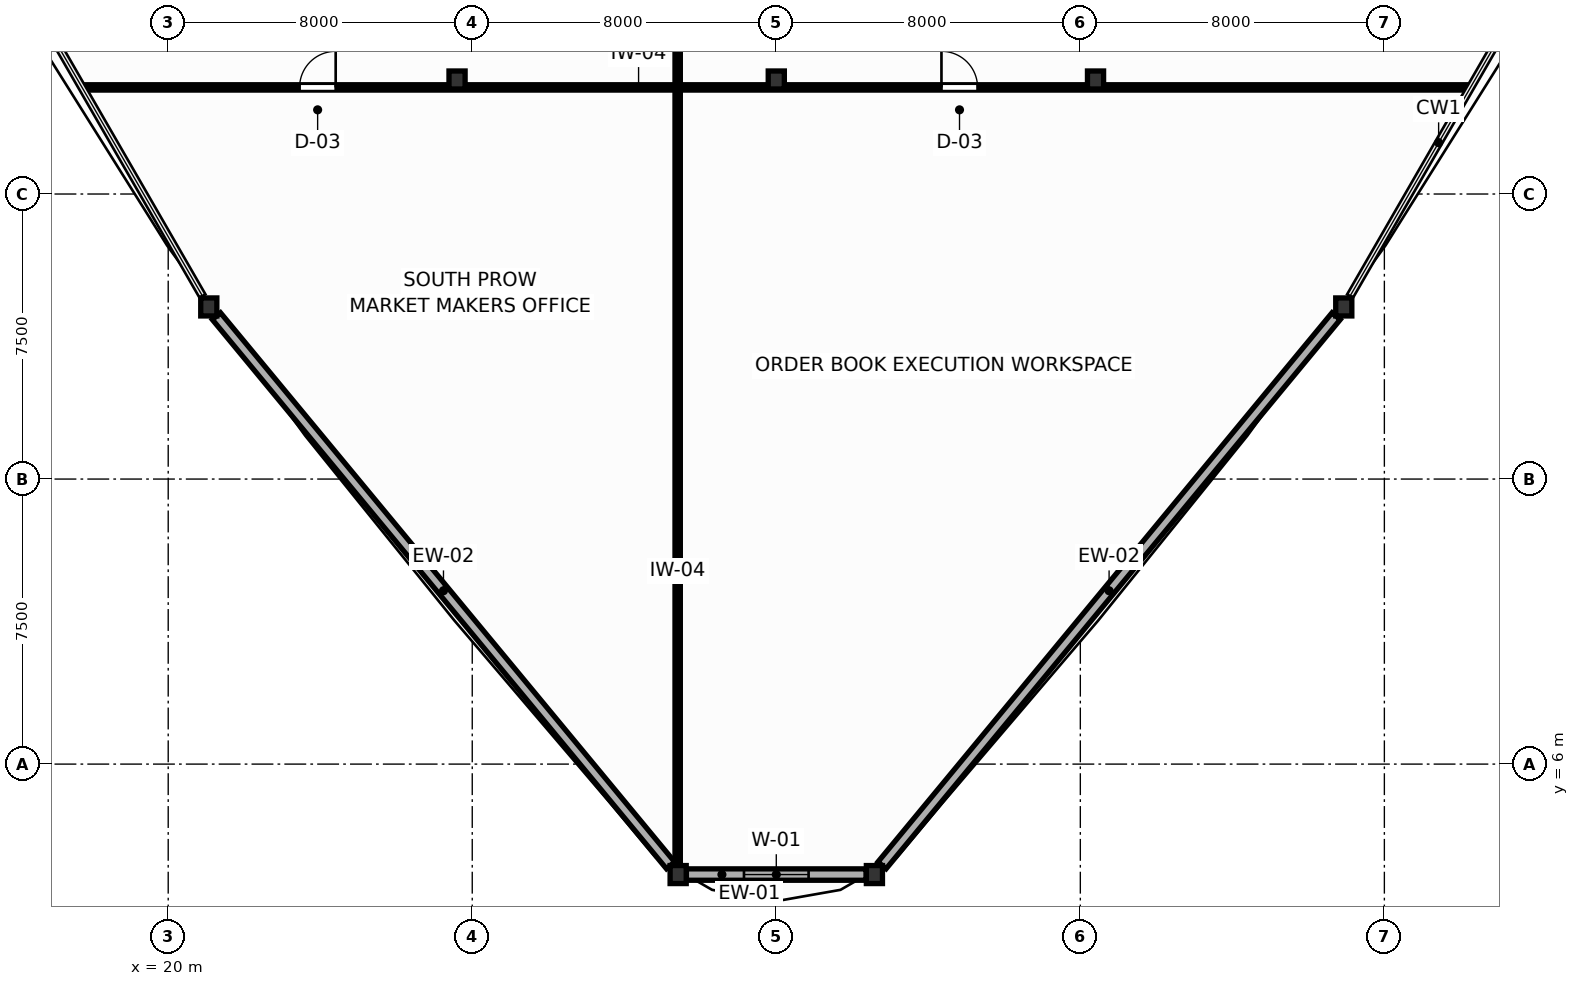
"""IFC4 building model, lengths in metres.
Left out: names, types, materials, properties, quantities, classifications, styles, units other than length and angle.
Written with IfcOpenShell. Run it as: python <this file> out.ifc"""

import sys

from ifc_helpers import new_model, si_unit, direction, frame, frame_2d, origin, origin_2d, place, context, subcontext, project, spatial, rectangle, i_section, extrude, source, transform, mapped, element, fill, save


model = new_model("IFC4")
c1 = context("Model", 3, precision=1e-05, world=origin(), true_north=direction((0.0, 1.0)))
c2 = subcontext(c1, "Body", "Model", "MODEL_VIEW")
j1 = project(units=[si_unit("LENGTHUNIT", "METRE"), si_unit("PLANEANGLEUNIT", "RADIAN")], contexts=[c1])
p1 = place(None, origin())
s1 = spatial("IfcSite", under=j1, at=p1, CompositionType="ELEMENT")
p2 = place(p1, origin())
s2 = spatial("IfcBuilding", under=s1, at=p2, CompositionType="ELEMENT")
p3 = place(p2, frame((0.0, 0.0, 27.9)))
s3 = spatial("IfcBuildingStorey", under=s2, at=p3, CompositionType="ELEMENT", Elevation=27.9)
m1 = source(origin(), c2, "Body", "SweptSolid", [
    extrude(i_section(OverallWidth=0.424, OverallDepth=0.474, WebThickness=0.045, FlangeThickness=0.072, FilletRadius=0.015, at=origin_2d()), origin(), (0.0, 0.0, 1.0), 3.9),
])
for number, where, z_axis, x_axis in (
    (1, (27.6, 24.0, 0.0), (0.0, 0.0, 1.0), (1.0, 0.0, 0.0)),
    (2, (44.4, 24.0, 0.0), (0.0, 0.0, 1.0), (1.0, 0.0, 0.0)),
    (3, (36.0, 24.0, 0.0), (0.0, 0.0, 1.0), (1.0, 0.0, 0.0)),
    (4, (21.068, 18.029, 0.0), (0.0, 0.0, 1.0), (1.0, 0.0, 0.0)),
    (5, (33.418, 3.094, 0.0), (0.0, 0.0, 1.0), (1.0, 0.0, 0.0)),
    (6, (38.582, 3.094, 0.0), (0.0, 0.0, 1.0), (1.0, 0.0, 0.0)),
    (7, (50.932, 18.029, 0.0), (0.0, 0.0, 1.0), (1.0, 0.0, 0.0)),
):
    element("IfcColumn", number, at=place(p3, frame(where, z_axis=z_axis, x_axis=x_axis)), inside=s3, PredefinedType="COLUMN", context=c2, shape_type="MappedRepresentation", body=[
        mapped(m1, transform((0.0, 0.0, 0.0), scale=1.0)),
    ])
p4 = place(p3, frame((21.268, 17.787, 0.0), z_axis=(0.0, 0.0, 1.0), x_axis=(0.637262575447, -0.770646747826, 0.0)))
e8 = element("IfcWall", 8, at=p4, inside=s3, PredefinedType="SOLIDWALL", context=c2, shape_type="SweptSolid", body=[
    extrude(rectangle(XDim=18.752, YDim=0.28, at=frame_2d((9.376, 0.0))), origin(), (0.0, 0.0, 1.0), 3.23),
])
p5 = place(p3, frame((33.635, 3.094, 0.0), z_axis=(0.0, 0.0, 1.0), x_axis=(1.0, 0.0, 0.0)))
e9 = element("IfcWall", 9, at=p5, inside=s3, PredefinedType="SOLIDWALL", context=c2, shape_type="SweptSolid", body=[
    extrude(rectangle(XDim=4.73, YDim=0.3, at=frame_2d((2.365, 0.0))), origin(), (0.0, 0.0, 1.0), 3.23),
])
p6 = place(p5, frame((1.515, 0.0, 0.75)))
e10 = element("IfcOpeningElement", 10, at=p6, cuts=e9, PredefinedType="OPENING", context=c2, shape_type="SweptSolid", body=[
    extrude(rectangle(XDim=1.7, YDim=1.75, at=frame_2d((0.85, 0.875))), frame((0.0, 0.16, 0.0), z_axis=(0.0, -1.0, 0.0), x_axis=(1.0, 0.0, 0.0)), (0.0, 0.0, 1.0), 0.32),
])
p7 = place(p3, frame((38.782, 3.336, 0.0), z_axis=(0.0, 0.0, 1.0), x_axis=(0.637262575447, 0.770646747826, 0.0)))
e11 = element("IfcWall", 11, at=p7, inside=s3, PredefinedType="SOLIDWALL", context=c2, shape_type="SweptSolid", body=[
    extrude(rectangle(XDim=18.752, YDim=0.28, at=frame_2d((9.376, 0.0))), origin(), (0.0, 0.0, 1.0), 3.23),
])
p8 = place(p3, frame((17.753, 23.805, 0.0), z_axis=(0.0, 0.0, 1.0), x_axis=(1.0, 0.0, 0.0)))
e12 = element("IfcWall", 12, at=p8, inside=s3, PredefinedType="PARTITIONING", context=c2, shape_type="SweptSolid", body=[
    extrude(rectangle(XDim=36.494, YDim=0.14, at=frame_2d((18.247, 0.0))), origin(), (0.0, 0.0, 1.0), 3.18),
])
p9 = place(p8, frame((5.704, 0.0, 0.0)))
e13 = element("IfcOpeningElement", 13, at=p9, cuts=e12, PredefinedType="OPENING", context=c2, shape_type="SweptSolid", body=[
    extrude(rectangle(XDim=0.95, YDim=2.05, at=frame_2d((0.475, 1.025))), frame((0.0, 0.08, 0.0), z_axis=(0.0, -1.0, 0.0), x_axis=(1.0, 0.0, 0.0)), (0.0, 0.0, 1.0), 0.16),
])
p10 = place(p8, frame((22.593, 0.0, 0.0)))
e14 = element("IfcOpeningElement", 14, at=p10, cuts=e12, PredefinedType="OPENING", context=c2, shape_type="SweptSolid", body=[
    extrude(rectangle(XDim=0.95, YDim=2.05, at=frame_2d((0.475, 1.025))), frame((0.0, 0.08, 0.0), z_axis=(0.0, -1.0, 0.0), x_axis=(1.0, 0.0, 0.0)), (0.0, 0.0, 1.0), 0.16),
])
p11 = place(p3, frame((33.405, 3.129, 0.0), z_axis=(0.0, 0.0, 1.0), x_axis=(0.0, 1.0, 0.0)))
e15 = element("IfcWall", 15, at=p11, inside=s3, PredefinedType="PARTITIONING", context=c2, shape_type="SweptSolid", body=[
    extrude(rectangle(XDim=23.561, YDim=0.14, at=frame_2d((11.78, 0.0))), origin(), (0.0, 0.0, 1.0), 3.18),
])
p12 = place(p6, origin())
e16 = element("IfcWindow", 16, at=p12, inside=s3, PartitioningType="SINGLE_PANEL", PredefinedType="WINDOW", context=c2, shape_type="SweptSolid", body=[
    extrude(rectangle(XDim=1.7, YDim=1.75, at=frame_2d((0.85, 0.875))), frame((0.0, 0.03, 0.0), z_axis=(0.0, -1.0, 0.0), x_axis=(1.0, 0.0, 0.0)), (0.0, 0.0, 1.0), 0.06),
])
fill(e10, e16)
p13 = place(p9, origin())
e17 = element("IfcDoor", 17, at=p13, inside=s3, OperationType="SINGLE_SWING_RIGHT", PredefinedType="DOOR", context=c2, shape_type="SweptSolid", body=[
    extrude(rectangle(XDim=0.95, YDim=2.05, at=frame_2d((0.475, 1.025))), frame((0.0, 0.025, 0.0), z_axis=(0.0, -1.0, 0.0), x_axis=(1.0, 0.0, 0.0)), (0.0, 0.0, 1.0), 0.05),
])
fill(e13, e17)
p14 = place(p10, origin())
e18 = element("IfcDoor", 18, at=p14, inside=s3, OperationType="SINGLE_SWING_LEFT", PredefinedType="DOOR", context=c2, shape_type="SweptSolid", body=[
    extrude(rectangle(XDim=0.95, YDim=2.05, at=frame_2d((0.475, 1.025))), frame((0.0, 0.025, 0.0), z_axis=(0.0, -1.0, 0.0), x_axis=(1.0, 0.0, 0.0)), (0.0, 0.0, 1.0), 0.05),
])
fill(e14, e18)
save(model, sys.argv[1])
